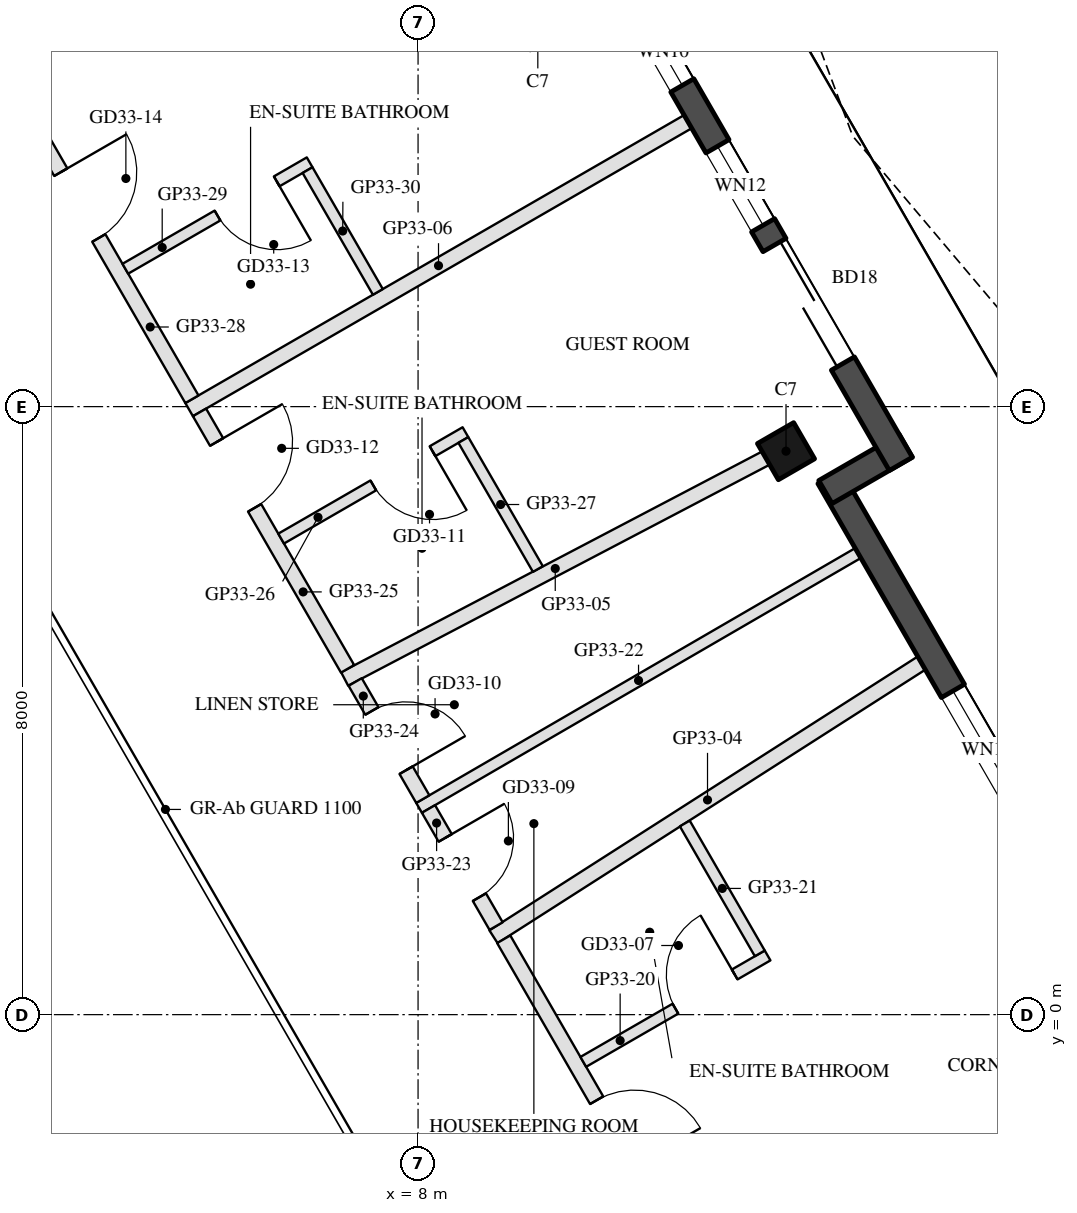
"""IFC4 building model, lengths in metres.
Left out: names, types, materials, properties, quantities, classifications, styles, units other than length and angle.
Written with IfcOpenShell. Run it as: python <this file> out.ifc"""

import sys

from ifc_helpers import new_model, si_unit, direction, frame, frame_2d, origin, origin_2d, place, context, subcontext, project, spatial, rectangle, hollow_rectangle, extrude, boolean, halfspace, element, fill, save


model = new_model("IFC4")
c1 = context("Model", 3, precision=1e-05, world=origin(), true_north=direction((0.0, 1.0)))
c2 = subcontext(c1, "Body", "Model", "MODEL_VIEW")
j1 = project(units=[si_unit("LENGTHUNIT", "METRE"), si_unit("PLANEANGLEUNIT", "RADIAN")], contexts=[c1])
p1 = place(None, origin())
s1 = spatial("IfcSite", under=j1, at=p1, CompositionType="ELEMENT")
p2 = place(p1, origin())
s2 = spatial("IfcBuilding", under=s1, at=p2, CompositionType="ELEMENT")
p3 = place(p2, frame((0.0, 0.0, 317.0)))
s3 = spatial("IfcBuildingStorey", under=s2, at=p3, CompositionType="ELEMENT", Elevation=317.0)
p4 = place(p3, frame((12.841, 7.414, 0.0), z_axis=(0.0, 0.0, 1.0), x_axis=(-0.5, 0.866025403784, 0.0)))
e1 = element("IfcColumn", 1, at=p4, inside=s3, PredefinedType="COLUMN", context=c2, shape_type="SweptSolid", body=[
    boolean("DIFFERENCE", extrude(hollow_rectangle(XDim=0.55, YDim=0.55, WallThickness=0.025, at=origin_2d()), origin(), (0.0, 0.0, 1.0), 3.7), halfspace(frame((0.0, 0.0, 3.668), z_axis=(0.0, 0.0, 1.0), x_axis=(1.0, 0.0, 0.0)), False)),
])
p5 = place(p3, frame((16.098, 2.423, 0.0), z_axis=(0.0, 0.0, 1.0), x_axis=(-0.499996591357, 0.866027371756, 0.0)))
e2 = element("IfcWall", 2, at=p5, inside=s3, PredefinedType="SOLIDWALL", context=c2, shape_type="SweptSolid", body=[
    extrude(rectangle(XDim=5.371, YDim=0.35, at=frame_2d((2.685, 0.0))), origin(), (0.0, 0.0, 1.0), 3.55),
])
p6 = place(p5, frame((0.32, 0.0, 0.3)))
e3 = element("IfcOpeningElement", 3, at=p6, cuts=e2, PredefinedType="OPENING", context=c2, shape_type="SweptSolid", body=[
    extrude(rectangle(XDim=1.8, YDim=2.65, at=frame_2d((0.9, 1.325))), frame((0.0, 0.185, 0.0), z_axis=(0.0, -1.0, 0.0), x_axis=(1.0, 0.0, 0.0)), (0.0, 0.0, 1.0), 0.37),
])
p7 = place(p3, frame((13.359, 6.876, 0.0), z_axis=(0.0, 0.0, 1.0), x_axis=(0.866092288191, 0.499884134912, 0.0)))
e4 = element("IfcWall", 4, at=p7, inside=s3, PredefinedType="SOLIDWALL", context=c2, shape_type="SweptSolid", body=[
    extrude(rectangle(XDim=1.22, YDim=0.35, at=frame_2d((0.61, 0.0))), origin(), (0.0, 0.0, 1.0), 3.55),
])
p8 = place(p3, frame((14.352, 7.247, 0.0), z_axis=(0.0, 0.0, 1.0), x_axis=(-0.499993893925, 0.8660289291, 0.0)))
e5 = element("IfcWall", 5, at=p8, inside=s3, PredefinedType="SOLIDWALL", context=c2, shape_type="SweptSolid", body=[
    extrude(rectangle(XDim=8.331, YDim=0.35, at=frame_2d((4.165, 0.0))), origin(), (0.0, 0.0, 1.0), 3.55),
])
p9 = place(p8, frame((1.525, 0.0, 0.0)))
e6 = element("IfcOpeningElement", 6, at=p9, cuts=e5, PredefinedType="OPENING", context=c2, shape_type="SweptSolid", body=[
    extrude(rectangle(XDim=1.8, YDim=2.4, at=frame_2d((0.9, 1.2))), frame((0.0, 0.185, 0.0), z_axis=(0.0, -1.0, 0.0), x_axis=(1.0, 0.0, 0.0)), (0.0, 0.0, 1.0), 0.37),
])
p10 = place(p8, frame((3.625, 0.0, 0.3)))
e7 = element("IfcOpeningElement", 7, at=p10, cuts=e5, PredefinedType="OPENING", context=c2, shape_type="SweptSolid", body=[
    extrude(rectangle(XDim=1.2, YDim=2.65, at=frame_2d((0.6, 1.325))), frame((0.0, 0.185, 0.0), z_axis=(0.0, -1.0, 0.0), x_axis=(1.0, 0.0, 0.0)), (0.0, 0.0, 1.0), 0.37),
])
p11 = place(p8, frame((5.75, 0.0, 0.3)))
e8 = element("IfcOpeningElement", 8, at=p11, cuts=e5, PredefinedType="OPENING", context=c2, shape_type="SweptSolid", body=[
    extrude(rectangle(XDim=1.0, YDim=2.65, at=frame_2d((0.5, 1.325))), frame((0.0, 0.185, 0.0), z_axis=(0.0, -1.0, 0.0), x_axis=(1.0, 0.0, 0.0)), (0.0, 0.0, 1.0), 0.37),
])
p12 = place(p3, frame((14.624, 4.625, 0.0), z_axis=(0.0, 0.0, 1.0), x_axis=(-0.842484919653, -0.53871992738, 0.0)))
e9 = element("IfcWall", 9, at=p12, inside=s3, PredefinedType="PARTITIONING", context=c2, shape_type="SweptSolid", body=[
    extrude(rectangle(XDim=6.685, YDim=0.2, at=frame_2d((3.342, 0.0))), origin(), (0.0, 0.0, 1.0), 3.1),
])
p13 = place(p3, frame((12.576, 7.323, 0.0), z_axis=(0.0, 0.0, 1.0), x_axis=(-0.885630617544, -0.464390363023, 0.0)))
e10 = element("IfcWall", 10, at=p13, inside=s3, PredefinedType="PARTITIONING", context=c2, shape_type="SweptSolid", body=[
    extrude(rectangle(XDim=6.258, YDim=0.2, at=frame_2d((3.129, 0.0))), origin(), (0.0, 0.0, 1.0), 3.1),
])
p14 = place(p3, frame((11.55, 11.749, 0.0), z_axis=(0.0, 0.0, 1.0), x_axis=(-0.866019793702, -0.500009716822, 0.0)))
e11 = element("IfcWall", 11, at=p14, inside=s3, PredefinedType="PARTITIONING", context=c2, shape_type="SweptSolid", body=[
    extrude(rectangle(XDim=7.577, YDim=0.2, at=frame_2d((3.789, 0.0))), origin(), (0.0, 0.0, 1.0), 3.1),
])
p15 = place(p3, frame((9.127, 0.992, 0.0), z_axis=(0.0, 0.0, 1.0), x_axis=(0.500012817413, -0.866018003521, 0.0)))
e12 = element("IfcWall", 12, at=p15, inside=s3, PredefinedType="PARTITIONING", context=c2, shape_type="SweptSolid", body=[
    extrude(rectangle(XDim=6.283, YDim=0.2, at=frame_2d((3.142, 0.0))), origin(), (0.0, 0.0, 1.0), 3.1),
])
p16 = place(p15, frame((2.446, 0.0, 0.0)))
e13 = element("IfcOpeningElement", 13, at=p16, cuts=e12, PredefinedType="OPENING", context=c2, shape_type="SweptSolid", body=[
    extrude(rectangle(XDim=1.0, YDim=2.1, at=frame_2d((0.5, 1.05))), frame((0.0, 0.11, 0.0), z_axis=(0.0, -1.0, 0.0), x_axis=(1.0, 0.0, 0.0)), (0.0, 0.0, 1.0), 0.22),
])
p17 = place(p3, frame((10.174, -0.622, 0.0), z_axis=(0.0, 0.0, 1.0), x_axis=(0.865996816683, 0.500049511043, 0.0)))
e14 = element("IfcWall", 14, at=p17, inside=s3, PredefinedType="PARTITIONING", context=c2, shape_type="SweptSolid", body=[
    extrude(rectangle(XDim=2.8, YDim=0.15, at=frame_2d((1.4, 0.0))), origin(), (0.0, 0.0, 1.0), 3.55),
])
p18 = place(p17, frame((1.4, 0.0, 0.0)))
e15 = element("IfcOpeningElement", 15, at=p18, cuts=e14, PredefinedType="OPENING", context=c2, shape_type="SweptSolid", body=[
    extrude(rectangle(XDim=0.9, YDim=2.1, at=frame_2d((0.45, 1.05))), frame((0.0, 0.085, 0.0), z_axis=(0.0, -1.0, 0.0), x_axis=(1.0, 0.0, 0.0)), (0.0, 0.0, 1.0), 0.17),
])
p19 = place(p3, frame((12.496, 0.806, 0.0), z_axis=(0.0, 0.0, 1.0), x_axis=(-0.499904503454, 0.866080531721, 0.0)))
e16 = element("IfcWall", 16, at=p19, inside=s3, PredefinedType="PARTITIONING", context=c2, shape_type="SweptSolid", body=[
    extrude(rectangle(XDim=1.974, YDim=0.15, at=frame_2d((0.987, 0.0))), origin(), (0.0, 0.0, 1.0), 3.55),
])
p20 = place(p3, frame((13.788, 6.073, 0.0), z_axis=(0.0, 0.0, 1.0), x_axis=(-0.864855005342, -0.502021732334, 0.0)))
e17 = element("IfcWall", 17, at=p20, inside=s3, PredefinedType="PARTITIONING", context=c2, shape_type="SweptSolid", body=[
    extrude(rectangle(XDim=6.677, YDim=0.15, at=frame_2d((3.339, 0.0))), origin(), (0.0, 0.0, 1.0), 3.1),
])
p21 = place(p3, frame((8.137, 2.706, 0.0), z_axis=(0.0, 0.0, 1.0), x_axis=(0.500035243338, -0.866005055078, 0.0)))
e18 = element("IfcWall", 18, at=p21, inside=s3, PredefinedType="PARTITIONING", context=c2, shape_type="SweptSolid", body=[
    extrude(rectangle(XDim=1.779, YDim=0.2, at=frame_2d((0.89, 0.0))), origin(), (0.0, 0.0, 1.0), 3.1),
])
p22 = place(p21, frame((0.44, 0.0, 0.0)))
e19 = element("IfcOpeningElement", 19, at=p22, cuts=e18, PredefinedType="OPENING", context=c2, shape_type="SweptSolid", body=[
    extrude(rectangle(XDim=0.9, YDim=2.1, at=frame_2d((0.45, 1.05))), frame((0.0, 0.11, 0.0), z_axis=(0.0, -1.0, 0.0), x_axis=(1.0, 0.0, 0.0)), (0.0, 0.0, 1.0), 0.22),
])
p23 = place(p3, frame((7.173, 4.377, 0.0), z_axis=(0.0, 0.0, 1.0), x_axis=(0.499975827765, -0.866039359181, 0.0)))
e20 = element("IfcWall", 20, at=p23, inside=s3, PredefinedType="PARTITIONING", context=c2, shape_type="SweptSolid", body=[
    extrude(rectangle(XDim=1.779, YDim=0.2, at=frame_2d((0.89, 0.0))), origin(), (0.0, 0.0, 1.0), 3.1),
])
p24 = place(p23, frame((0.44, 0.0, 0.0)))
e21 = element("IfcOpeningElement", 21, at=p24, cuts=e20, PredefinedType="OPENING", context=c2, shape_type="SweptSolid", body=[
    extrude(rectangle(XDim=0.9, YDim=2.1, at=frame_2d((0.45, 1.05))), frame((0.0, 0.11, 0.0), z_axis=(0.0, -1.0, 0.0), x_axis=(1.0, 0.0, 0.0)), (0.0, 0.0, 1.0), 0.22),
])
p25 = place(p3, frame((5.125, 7.924, 0.0), z_axis=(0.0, 0.0, 1.0), x_axis=(0.500028041952, -0.866009213151, 0.0)))
e22 = element("IfcWall", 22, at=p25, inside=s3, PredefinedType="PARTITIONING", context=c2, shape_type="SweptSolid", body=[
    extrude(rectangle(XDim=3.896, YDim=0.2, at=frame_2d((1.948, 0.0))), origin(), (0.0, 0.0, 1.0), 3.1),
])
p26 = place(p25, frame((0.45, 0.0, 0.0)))
e23 = element("IfcOpeningElement", 23, at=p26, cuts=e22, PredefinedType="OPENING", context=c2, shape_type="SweptSolid", body=[
    extrude(rectangle(XDim=1.0, YDim=2.1, at=frame_2d((0.5, 1.05))), frame((0.0, 0.11, 0.0), z_axis=(0.0, -1.0, 0.0), x_axis=(1.0, 0.0, 0.0)), (0.0, 0.0, 1.0), 0.22),
])
p27 = place(p3, frame((8.624, 7.664, 0.0), z_axis=(0.0, 0.0, 1.0), x_axis=(-0.866034573852, -0.49998411664, 0.0)))
e24 = element("IfcWall", 24, at=p27, inside=s3, PredefinedType="PARTITIONING", context=c2, shape_type="SweptSolid", body=[
    extrude(rectangle(XDim=2.8, YDim=0.15, at=frame_2d((1.4, 0.0))), origin(), (0.0, 0.0, 1.0), 3.55),
])
p28 = place(p27, frame((0.5, 0.0, 0.0)))
e25 = element("IfcOpeningElement", 25, at=p28, cuts=e24, PredefinedType="OPENING", context=c2, shape_type="SweptSolid", body=[
    extrude(rectangle(XDim=0.9, YDim=2.1, at=frame_2d((0.45, 1.05))), frame((0.0, 0.085, 0.0), z_axis=(0.0, -1.0, 0.0), x_axis=(1.0, 0.0, 0.0)), (0.0, 0.0, 1.0), 0.17),
])
p29 = place(p3, frame((9.576, 5.863, 0.0), z_axis=(0.0, 0.0, 1.0), x_axis=(-0.499956000529, 0.8660508054, 0.0)))
e26 = element("IfcWall", 26, at=p29, inside=s3, PredefinedType="PARTITIONING", context=c2, shape_type="SweptSolid", body=[
    extrude(rectangle(XDim=1.961, YDim=0.15, at=frame_2d((0.98, 0.0))), origin(), (0.0, 0.0, 1.0), 3.55),
])
p30 = place(p3, frame((2.281, 12.85, 0.0), z_axis=(0.0, 0.0, 1.0), x_axis=(0.500004836318, -0.866022611517, 0.0)))
e27 = element("IfcWall", 27, at=p30, inside=s3, PredefinedType="PARTITIONING", context=c2, shape_type="SweptSolid", body=[
    extrude(rectangle(XDim=5.488, YDim=0.2, at=frame_2d((2.744, 0.0))), origin(), (0.0, 0.0, 1.0), 3.1),
])
p31 = place(p30, frame((2.038, 0.0, 0.0)))
e28 = element("IfcOpeningElement", 28, at=p31, cuts=e27, PredefinedType="OPENING", context=c2, shape_type="SweptSolid", body=[
    extrude(rectangle(XDim=1.0, YDim=2.1, at=frame_2d((0.5, 1.05))), frame((0.0, 0.11, 0.0), z_axis=(0.0, -1.0, 0.0), x_axis=(1.0, 0.0, 0.0)), (0.0, 0.0, 1.0), 0.22),
])
p32 = place(p3, frame((6.573, 11.214, 0.0), z_axis=(0.0, 0.0, 1.0), x_axis=(-0.866034573852, -0.49998411664, 0.0)))
e29 = element("IfcWall", 29, at=p32, inside=s3, PredefinedType="PARTITIONING", context=c2, shape_type="SweptSolid", body=[
    extrude(rectangle(XDim=2.8, YDim=0.15, at=frame_2d((1.4, 0.0))), origin(), (0.0, 0.0, 1.0), 3.1),
])
p33 = place(p32, frame((0.5, 0.0, 0.0)))
e30 = element("IfcOpeningElement", 30, at=p33, cuts=e29, PredefinedType="OPENING", context=c2, shape_type="SweptSolid", body=[
    extrude(rectangle(XDim=0.9, YDim=2.1, at=frame_2d((0.45, 1.05))), frame((0.0, 0.085, 0.0), z_axis=(0.0, -1.0, 0.0), x_axis=(1.0, 0.0, 0.0)), (0.0, 0.0, 1.0), 0.17),
])
p34 = place(p3, frame((7.471, 9.51, 0.0), z_axis=(0.0, 0.0, 1.0), x_axis=(-0.499985172903, 0.866033964044, 0.0)))
e31 = element("IfcWall", 31, at=p34, inside=s3, PredefinedType="PARTITIONING", context=c2, shape_type="SweptSolid", body=[
    extrude(rectangle(XDim=1.85, YDim=0.15, at=frame_2d((0.925, 0.0))), origin(), (0.0, 0.0, 1.0), 3.55),
])
p35 = place(p6, origin())
e32 = element("IfcWindow", 32, at=p35, inside=s3, PartitioningType="SINGLE_PANEL", PredefinedType="WINDOW", context=c2, shape_type="SweptSolid", body=[
    extrude(rectangle(XDim=1.8, YDim=2.65, at=frame_2d((0.9, 1.325))), frame((0.0, 0.03, 0.0), z_axis=(0.0, -1.0, 0.0), x_axis=(1.0, 0.0, 0.0)), (0.0, 0.0, 1.0), 0.06),
])
fill(e3, e32)
p36 = place(p9, frame((1.8, 0.0, 0.0), z_axis=(0.0, 0.0, 1.0), x_axis=(-1.0, 0.0, 0.0)))
e33 = element("IfcDoor", 33, at=p36, inside=s3, OperationType="SLIDING_TO_LEFT", PredefinedType="DOOR", context=c2, shape_type="SweptSolid", body=[
    extrude(rectangle(XDim=1.8, YDim=2.4, at=frame_2d((0.9, 1.2))), frame((0.0, 0.025, 0.0), z_axis=(0.0, -1.0, 0.0), x_axis=(1.0, 0.0, 0.0)), (0.0, 0.0, 1.0), 0.05),
])
fill(e6, e33)
p37 = place(p10, origin())
e34 = element("IfcWindow", 34, at=p37, inside=s3, PartitioningType="SINGLE_PANEL", PredefinedType="WINDOW", context=c2, shape_type="SweptSolid", body=[
    extrude(rectangle(XDim=1.2, YDim=2.65, at=frame_2d((0.6, 1.325))), frame((0.0, 0.03, 0.0), z_axis=(0.0, -1.0, 0.0), x_axis=(1.0, 0.0, 0.0)), (0.0, 0.0, 1.0), 0.06),
])
fill(e7, e34)
p38 = place(p11, origin())
e35 = element("IfcWindow", 35, at=p38, inside=s3, PartitioningType="SINGLE_PANEL", PredefinedType="WINDOW", context=c2, shape_type="SweptSolid", body=[
    extrude(rectangle(XDim=1.0, YDim=2.65, at=frame_2d((0.5, 1.325))), frame((0.0, 0.03, 0.0), z_axis=(0.0, -1.0, 0.0), x_axis=(1.0, 0.0, 0.0)), (0.0, 0.0, 1.0), 0.06),
])
fill(e8, e35)
p39 = place(p18, origin())
e36 = element("IfcDoor", 36, at=p39, inside=s3, OperationType="SINGLE_SWING_RIGHT", PredefinedType="DOOR", context=c2, shape_type="SweptSolid", body=[
    extrude(rectangle(XDim=0.9, YDim=2.1, at=frame_2d((0.45, 1.05))), frame((0.0, 0.025, 0.0), z_axis=(0.0, -1.0, 0.0), x_axis=(1.0, 0.0, 0.0)), (0.0, 0.0, 1.0), 0.05),
])
fill(e15, e36)
p40 = place(p16, origin())
e37 = element("IfcDoor", 37, at=p40, inside=s3, OperationType="SINGLE_SWING_RIGHT", PredefinedType="DOOR", context=c2, shape_type="SweptSolid", body=[
    extrude(rectangle(XDim=1.0, YDim=2.1, at=frame_2d((0.5, 1.05))), frame((0.0, 0.025, 0.0), z_axis=(0.0, -1.0, 0.0), x_axis=(1.0, 0.0, 0.0)), (0.0, 0.0, 1.0), 0.05),
])
fill(e13, e37)
p41 = place(p22, origin())
e38 = element("IfcDoor", 38, at=p41, inside=s3, OperationType="SINGLE_SWING_LEFT", PredefinedType="DOOR", context=c2, shape_type="SweptSolid", body=[
    extrude(rectangle(XDim=0.9, YDim=2.1, at=frame_2d((0.45, 1.05))), frame((0.0, 0.025, 0.0), z_axis=(0.0, -1.0, 0.0), x_axis=(1.0, 0.0, 0.0)), (0.0, 0.0, 1.0), 0.05),
])
fill(e19, e38)
p42 = place(p24, origin())
e39 = element("IfcDoor", 39, at=p42, inside=s3, OperationType="SINGLE_SWING_RIGHT", PredefinedType="DOOR", context=c2, shape_type="SweptSolid", body=[
    extrude(rectangle(XDim=0.9, YDim=2.1, at=frame_2d((0.45, 1.05))), frame((0.0, 0.025, 0.0), z_axis=(0.0, -1.0, 0.0), x_axis=(1.0, 0.0, 0.0)), (0.0, 0.0, 1.0), 0.05),
])
fill(e21, e39)
p43 = place(p28, origin())
e40 = element("IfcDoor", 40, at=p43, inside=s3, OperationType="SINGLE_SWING_LEFT", PredefinedType="DOOR", context=c2, shape_type="SweptSolid", body=[
    extrude(rectangle(XDim=0.9, YDim=2.1, at=frame_2d((0.45, 1.05))), frame((0.0, 0.025, 0.0), z_axis=(0.0, -1.0, 0.0), x_axis=(1.0, 0.0, 0.0)), (0.0, 0.0, 1.0), 0.05),
])
fill(e25, e40)
p44 = place(p26, origin())
e41 = element("IfcDoor", 41, at=p44, inside=s3, OperationType="SINGLE_SWING_LEFT", PredefinedType="DOOR", context=c2, shape_type="SweptSolid", body=[
    extrude(rectangle(XDim=1.0, YDim=2.1, at=frame_2d((0.5, 1.05))), frame((0.0, 0.025, 0.0), z_axis=(0.0, -1.0, 0.0), x_axis=(1.0, 0.0, 0.0)), (0.0, 0.0, 1.0), 0.05),
])
fill(e23, e41)
p45 = place(p33, origin())
e42 = element("IfcDoor", 42, at=p45, inside=s3, OperationType="SINGLE_SWING_LEFT", PredefinedType="DOOR", context=c2, shape_type="SweptSolid", body=[
    extrude(rectangle(XDim=0.9, YDim=2.1, at=frame_2d((0.45, 1.05))), frame((0.0, 0.025, 0.0), z_axis=(0.0, -1.0, 0.0), x_axis=(1.0, 0.0, 0.0)), (0.0, 0.0, 1.0), 0.05),
])
fill(e30, e42)
p46 = place(p31, origin())
e43 = element("IfcDoor", 43, at=p46, inside=s3, OperationType="SINGLE_SWING_LEFT", PredefinedType="DOOR", context=c2, shape_type="SweptSolid", body=[
    extrude(rectangle(XDim=1.0, YDim=2.1, at=frame_2d((0.5, 1.05))), frame((0.0, 0.025, 0.0), z_axis=(0.0, -1.0, 0.0), x_axis=(1.0, 0.0, 0.0)), (0.0, 0.0, 1.0), 0.05),
])
fill(e28, e43)
save(model, sys.argv[1])
